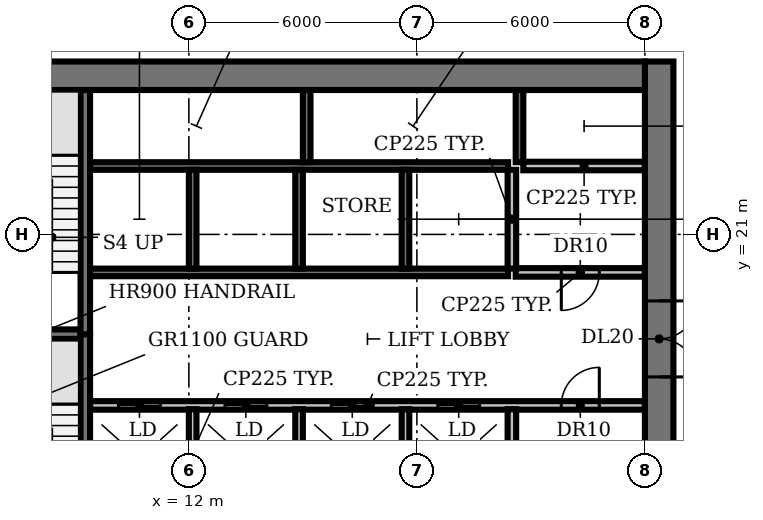
"""IFC4 building model, lengths in metres.
Left out: names, types, materials, properties, quantities, classifications, styles, units other than length and angle.
Written with IfcOpenShell. Run it as: python <this file> out.ifc"""

import sys

from ifc_helpers import new_model, si_unit, direction, frame, frame_2d, origin, place, context, subcontext, project, spatial, rectangle, extrude, element, fill, save


model = new_model("IFC4")
c1 = context("Model", 3, precision=1e-05, world=origin(), true_north=direction((0.0, 1.0)))
c2 = subcontext(c1, "Body", "Model", "MODEL_VIEW")
j1 = project(units=[si_unit("LENGTHUNIT", "METRE"), si_unit("PLANEANGLEUNIT", "RADIAN")], contexts=[c1])
p1 = place(None, origin())
s1 = spatial("IfcSite", under=j1, at=p1, CompositionType="ELEMENT")
p2 = place(p1, origin())
s2 = spatial("IfcBuilding", under=s1, at=p2, CompositionType="ELEMENT")
p3 = place(p2, frame((0.0, 0.0, 134.0)))
s3 = spatial("IfcBuildingStorey", under=s2, at=p3, CompositionType="ELEMENT", Elevation=134.0)
p4 = place(p3, frame((9.4, 16.5, 0.0), z_axis=(0.0, 0.0, 1.0), x_axis=(1.0, 0.0, 0.0)))
e1 = element("IfcWall", 1, at=p4, inside=s3, PredefinedType="PARTITIONING", context=c2, shape_type="SweptSolid", body=[
    extrude(rectangle(XDim=14.6, YDim=0.225, at=frame_2d((7.3, 0.0))), origin(), (0.0, 0.0, 1.0), 3.8),
])
p5 = place(p4, frame((0.75, 0.0, 0.0)))
e2 = element("IfcOpeningElement", 2, at=p5, cuts=e1, PredefinedType="OPENING", context=c2, shape_type="SweptSolid", body=[
    extrude(rectangle(XDim=1.1, YDim=2.1, at=frame_2d((0.55, 1.05))), frame((0.0, 0.123, 0.0), z_axis=(0.0, -1.0, 0.0), x_axis=(1.0, 0.0, 0.0)), (0.0, 0.0, 1.0), 0.245),
])
p6 = place(p4, frame((3.55, 0.0, 0.0)))
e3 = element("IfcOpeningElement", 3, at=p6, cuts=e1, PredefinedType="OPENING", context=c2, shape_type="SweptSolid", body=[
    extrude(rectangle(XDim=1.1, YDim=2.1, at=frame_2d((0.55, 1.05))), frame((0.0, 0.123, 0.0), z_axis=(0.0, -1.0, 0.0), x_axis=(1.0, 0.0, 0.0)), (0.0, 0.0, 1.0), 0.245),
])
p7 = place(p4, frame((6.35, 0.0, 0.0)))
e4 = element("IfcOpeningElement", 4, at=p7, cuts=e1, PredefinedType="OPENING", context=c2, shape_type="SweptSolid", body=[
    extrude(rectangle(XDim=1.1, YDim=2.1, at=frame_2d((0.55, 1.05))), frame((0.0, 0.123, 0.0), z_axis=(0.0, -1.0, 0.0), x_axis=(1.0, 0.0, 0.0)), (0.0, 0.0, 1.0), 0.245),
])
p8 = place(p4, frame((9.15, 0.0, 0.0)))
e5 = element("IfcOpeningElement", 5, at=p8, cuts=e1, PredefinedType="OPENING", context=c2, shape_type="SweptSolid", body=[
    extrude(rectangle(XDim=1.1, YDim=2.1, at=frame_2d((0.55, 1.05))), frame((0.0, 0.123, 0.0), z_axis=(0.0, -1.0, 0.0), x_axis=(1.0, 0.0, 0.0)), (0.0, 0.0, 1.0), 0.245),
])
p9 = place(p4, frame((12.4, 0.0, 0.0)))
e6 = element("IfcOpeningElement", 6, at=p9, cuts=e1, PredefinedType="OPENING", context=c2, shape_type="SweptSolid", body=[
    extrude(rectangle(XDim=1.0, YDim=2.1, at=frame_2d((0.5, 1.05))), frame((0.0, 0.123, 0.0), z_axis=(0.0, -1.0, 0.0), x_axis=(1.0, 0.0, 0.0)), (0.0, 0.0, 1.0), 0.245),
])
p10 = place(p3, frame((6.0, 18.375, 0.0), z_axis=(0.0, 0.0, 1.0), x_axis=(1.0, 0.0, 0.0)))
e7 = element("IfcWall", 7, at=p10, inside=s3, PredefinedType="SHEAR", context=c2, shape_type="SweptSolid", body=[
    extrude(rectangle(XDim=3.15, YDim=0.25, at=frame_2d((1.575, 0.0))), origin(), (0.0, 0.0, 1.0), 3.8),
])
p11 = place(p3, frame((9.4, 20.0, 0.0), z_axis=(0.0, 0.0, 1.0), x_axis=(1.0, 0.0, 0.0)))
e8 = element("IfcWall", 8, at=p11, inside=s3, PredefinedType="SHEAR", context=c2, shape_type="SweptSolid", body=[
    extrude(rectangle(XDim=11.0, YDim=0.2, at=frame_2d((5.5, 0.0))), origin(), (0.0, 0.0, 1.0), 3.8),
])
p12 = place(p3, frame((24.0, 20.0, 0.0), z_axis=(0.0, 0.0, 1.0), x_axis=(-1.0, 0.0, 0.0)))
e9 = element("IfcWall", 9, at=p12, inside=s3, PredefinedType="PARTITIONING", context=c2, shape_type="SweptSolid", body=[
    extrude(rectangle(XDim=3.4, YDim=0.225, at=frame_2d((1.7, 0.0))), origin(), (0.0, 0.0, 1.0), 3.8),
])
p13 = place(p12, frame((1.2, 0.0, 0.0)))
e10 = element("IfcOpeningElement", 10, at=p13, cuts=e9, PredefinedType="OPENING", context=c2, shape_type="SweptSolid", body=[
    extrude(rectangle(XDim=1.0, YDim=2.1, at=frame_2d((0.5, 1.05))), frame((0.0, 0.123, 0.0), z_axis=(0.0, -1.0, 0.0), x_axis=(1.0, 0.0, 0.0)), (0.0, 0.0, 1.0), 0.245),
])
p14 = place(p3, frame((9.4, 22.8, 0.0), z_axis=(0.0, 0.0, 1.0), x_axis=(1.0, 0.0, 0.0)))
e11 = element("IfcWall", 11, at=p14, inside=s3, PredefinedType="SHEAR", context=c2, shape_type="SweptSolid", body=[
    extrude(rectangle(XDim=11.0, YDim=0.2, at=frame_2d((5.5, 0.0))), origin(), (0.0, 0.0, 1.0), 3.8),
])
p15 = place(p3, frame((20.8, 22.8, 0.0), z_axis=(0.0, 0.0, 1.0), x_axis=(1.0, 0.0, 0.0)))
e12 = element("IfcWall", 12, at=p15, inside=s3, PredefinedType="PARTITIONING", context=c2, shape_type="SweptSolid", body=[
    extrude(rectangle(XDim=3.2, YDim=0.225, at=frame_2d((1.6, 0.0))), origin(), (0.0, 0.0, 1.0), 3.8),
])
p16 = place(p3, frame((9.275, 18.375, 0.0), z_axis=(0.0, 0.0, 1.0), x_axis=(0.0, -1.0, 0.0)))
e13 = element("IfcWall", 13, at=p16, inside=s3, PredefinedType="SHEAR", context=c2, shape_type="SweptSolid", body=[
    extrude(rectangle(XDim=6.55, YDim=0.25, at=frame_2d((3.275, 0.0))), origin(), (0.0, 0.0, 1.0), 3.8),
])
p17 = place(p16, frame((5.075, 0.0, 0.0)))
e14 = element("IfcOpeningElement", 14, at=p17, cuts=e13, PredefinedType="OPENING", context=c2, shape_type="SweptSolid", body=[
    extrude(rectangle(XDim=1.0, YDim=2.1, at=frame_2d((0.5, 1.05))), frame((0.0, 0.135, 0.0), z_axis=(0.0, -1.0, 0.0), x_axis=(1.0, 0.0, 0.0)), (0.0, 0.0, 1.0), 0.27),
])
p18 = place(p3, frame((9.275, 18.375, 0.0), z_axis=(0.0, 0.0, 1.0), x_axis=(0.0, 1.0, 0.0)))
e15 = element("IfcWall", 15, at=p18, inside=s3, PredefinedType="SHEAR", context=c2, shape_type="SweptSolid", body=[
    extrude(rectangle(XDim=6.425, YDim=0.25, at=frame_2d((3.212, 0.0))), origin(), (0.0, 0.0, 1.0), 3.8),
])
p19 = place(p3, frame((12.1, 13.8, 0.0), z_axis=(0.0, 0.0, 1.0), x_axis=(0.0, 1.0, 0.0)))
e16 = element("IfcWall", 16, at=p19, inside=s3, PredefinedType="SOLIDWALL", context=c2, shape_type="SweptSolid", body=[
    extrude(rectangle(XDim=2.6, YDim=0.2, at=frame_2d((1.3, 0.0))), origin(), (0.0, 0.0, 1.0), 3.8),
])
p20 = place(p3, frame((12.1, 20.1, 0.0), z_axis=(0.0, 0.0, 1.0), x_axis=(0.0, 1.0, 0.0)))
e17 = element("IfcWall", 17, at=p20, inside=s3, PredefinedType="SHEAR", context=c2, shape_type="SweptSolid", body=[
    extrude(rectangle(XDim=2.6, YDim=0.2, at=frame_2d((1.3, 0.0))), origin(), (0.0, 0.0, 1.0), 3.8),
])
p21 = place(p3, frame((14.9, 13.8, 0.0), z_axis=(0.0, 0.0, 1.0), x_axis=(0.0, 1.0, 0.0)))
e18 = element("IfcWall", 18, at=p21, inside=s3, PredefinedType="SOLIDWALL", context=c2, shape_type="SweptSolid", body=[
    extrude(rectangle(XDim=2.6, YDim=0.2, at=frame_2d((1.3, 0.0))), origin(), (0.0, 0.0, 1.0), 3.8),
])
p22 = place(p3, frame((14.9, 20.1, 0.0), z_axis=(0.0, 0.0, 1.0), x_axis=(0.0, 1.0, 0.0)))
e19 = element("IfcWall", 19, at=p22, inside=s3, PredefinedType="SHEAR", context=c2, shape_type="SweptSolid", body=[
    extrude(rectangle(XDim=2.6, YDim=0.2, at=frame_2d((1.3, 0.0))), origin(), (0.0, 0.0, 1.0), 3.8),
])
p23 = place(p3, frame((15.1, 22.9, 0.0), z_axis=(0.0, 0.0, 1.0), x_axis=(0.0, 1.0, 0.0)))
e20 = element("IfcWall", 20, at=p23, inside=s3, PredefinedType="SHEAR", context=c2, shape_type="SweptSolid", body=[
    extrude(rectangle(XDim=1.9, YDim=0.2, at=frame_2d((0.95, 0.0))), origin(), (0.0, 0.0, 1.0), 3.8),
])
p24 = place(p3, frame((17.7, 13.8, 0.0), z_axis=(0.0, 0.0, 1.0), x_axis=(0.0, 1.0, 0.0)))
e21 = element("IfcWall", 21, at=p24, inside=s3, PredefinedType="SOLIDWALL", context=c2, shape_type="SweptSolid", body=[
    extrude(rectangle(XDim=2.6, YDim=0.2, at=frame_2d((1.3, 0.0))), origin(), (0.0, 0.0, 1.0), 3.8),
])
p25 = place(p3, frame((17.7, 20.1, 0.0), z_axis=(0.0, 0.0, 1.0), x_axis=(0.0, 1.0, 0.0)))
e22 = element("IfcWall", 22, at=p25, inside=s3, PredefinedType="SHEAR", context=c2, shape_type="SweptSolid", body=[
    extrude(rectangle(XDim=2.6, YDim=0.2, at=frame_2d((1.3, 0.0))), origin(), (0.0, 0.0, 1.0), 3.8),
])
for number, where, z_axis, x_axis in (
    (23, (20.5, 13.8, 0.0), (0.0, 0.0, 1.0), (0.0, 1.0, 0.0)),
    (24, (20.5, 20.1, 0.0), (0.0, 0.0, 1.0), (0.0, 1.0, 0.0)),
):
    element("IfcWall", number, at=place(p3, frame(where, z_axis=z_axis, x_axis=x_axis)), inside=s3, PredefinedType="PARTITIONING", context=c2, shape_type="SweptSolid", body=[
        extrude(rectangle(XDim=2.6, YDim=0.225, at=frame_2d((1.3, 0.0))), origin(), (0.0, 0.0, 1.0), 3.8),
    ])
p26 = place(p3, frame((20.7, 22.9, 0.0), z_axis=(0.0, 0.0, 1.0), x_axis=(0.0, 1.0, 0.0)))
e25 = element("IfcWall", 25, at=p26, inside=s3, PredefinedType="SHEAR", context=c2, shape_type="SweptSolid", body=[
    extrude(rectangle(XDim=1.9, YDim=0.2, at=frame_2d((0.95, 0.0))), origin(), (0.0, 0.0, 1.0), 3.8),
])
p27 = place(p3, frame((24.375, 25.55, 0.0), z_axis=(0.0, 0.0, 1.0), x_axis=(0.0, -1.0, 0.0)))
e26 = element("IfcWall", 26, at=p27, inside=s3, PredefinedType="SHEAR", context=c2, shape_type="SweptSolid", body=[
    extrude(rectangle(XDim=21.08, YDim=0.75, at=frame_2d((10.54, 0.0))), origin(), (0.0, 0.0, 1.0), 3.8),
])
p28 = place(p27, frame((18.4, 0.0, 0.0)))
e27 = element("IfcOpeningElement", 27, at=p28, cuts=e26, PredefinedType="OPENING", context=c2, shape_type="SweptSolid", body=[
    extrude(rectangle(XDim=1.5, YDim=2.1, at=frame_2d((0.75, 1.05))), frame((0.0, 0.385, 0.0), z_axis=(0.0, -1.0, 0.0), x_axis=(1.0, 0.0, 0.0)), (0.0, 0.0, 1.0), 0.77),
])
p29 = place(p27, frame((12.3, 0.0, 0.0)))
e28 = element("IfcOpeningElement", 28, at=p29, cuts=e26, PredefinedType="OPENING", context=c2, shape_type="SweptSolid", body=[
    extrude(rectangle(XDim=0.9, YDim=2.1, at=frame_2d((0.45, 1.05))), frame((0.0, 0.385, 0.0), z_axis=(0.0, -1.0, 0.0), x_axis=(1.0, 0.0, 0.0)), (0.0, 0.0, 1.0), 0.77),
])
p30 = place(p27, frame((6.3, 0.0, 0.0)))
e29 = element("IfcOpeningElement", 29, at=p30, cuts=e26, PredefinedType="OPENING", context=c2, shape_type="SweptSolid", body=[
    extrude(rectangle(XDim=2.0, YDim=2.1, at=frame_2d((1.0, 1.05))), frame((0.0, 0.385, 0.0), z_axis=(0.0, -1.0, 0.0), x_axis=(1.0, 0.0, 0.0)), (0.0, 0.0, 1.0), 0.77),
])
p31 = place(p3, frame((6.0, 25.175, 0.0), z_axis=(0.0, 0.0, 1.0), x_axis=(1.0, 0.0, 0.0)))
e30 = element("IfcWall", 30, at=p31, inside=s3, PredefinedType="SHEAR", context=c2, shape_type="SweptSolid", body=[
    extrude(rectangle(XDim=18.0, YDim=0.75, at=frame_2d((9.0, 0.0))), origin(), (0.0, 0.0, 1.0), 3.8),
])
p32 = place(p5, origin())
e31 = element("IfcDoor", 31, at=p32, inside=s3, OperationType="DOUBLE_DOOR_SLIDING", PredefinedType="DOOR", context=c2, shape_type="SweptSolid", body=[
    extrude(rectangle(XDim=1.1, YDim=2.1, at=frame_2d((0.55, 1.05))), frame((0.0, 0.025, 0.0), z_axis=(0.0, -1.0, 0.0), x_axis=(1.0, 0.0, 0.0)), (0.0, 0.0, 1.0), 0.05),
])
fill(e2, e31)
p33 = place(p6, origin())
e32 = element("IfcDoor", 32, at=p33, inside=s3, OperationType="DOUBLE_DOOR_SLIDING", PredefinedType="DOOR", context=c2, shape_type="SweptSolid", body=[
    extrude(rectangle(XDim=1.1, YDim=2.1, at=frame_2d((0.55, 1.05))), frame((0.0, 0.025, 0.0), z_axis=(0.0, -1.0, 0.0), x_axis=(1.0, 0.0, 0.0)), (0.0, 0.0, 1.0), 0.05),
])
fill(e3, e32)
p34 = place(p7, origin())
e33 = element("IfcDoor", 33, at=p34, inside=s3, OperationType="DOUBLE_DOOR_SLIDING", PredefinedType="DOOR", context=c2, shape_type="SweptSolid", body=[
    extrude(rectangle(XDim=1.1, YDim=2.1, at=frame_2d((0.55, 1.05))), frame((0.0, 0.025, 0.0), z_axis=(0.0, -1.0, 0.0), x_axis=(1.0, 0.0, 0.0)), (0.0, 0.0, 1.0), 0.05),
])
fill(e4, e33)
p35 = place(p8, origin())
e34 = element("IfcDoor", 34, at=p35, inside=s3, OperationType="DOUBLE_DOOR_SLIDING", PredefinedType="DOOR", context=c2, shape_type="SweptSolid", body=[
    extrude(rectangle(XDim=1.1, YDim=2.1, at=frame_2d((0.55, 1.05))), frame((0.0, 0.025, 0.0), z_axis=(0.0, -1.0, 0.0), x_axis=(1.0, 0.0, 0.0)), (0.0, 0.0, 1.0), 0.05),
])
fill(e5, e34)
p36 = place(p9, origin())
e35 = element("IfcDoor", 35, at=p36, inside=s3, OperationType="SINGLE_SWING_RIGHT", PredefinedType="DOOR", context=c2, shape_type="SweptSolid", body=[
    extrude(rectangle(XDim=1.0, YDim=2.1, at=frame_2d((0.5, 1.05))), frame((0.0, 0.025, 0.0), z_axis=(0.0, -1.0, 0.0), x_axis=(1.0, 0.0, 0.0)), (0.0, 0.0, 1.0), 0.05),
])
fill(e6, e35)
p37 = place(p13, origin())
e36 = element("IfcDoor", 36, at=p37, inside=s3, OperationType="SINGLE_SWING_RIGHT", PredefinedType="DOOR", context=c2, shape_type="SweptSolid", body=[
    extrude(rectangle(XDim=1.0, YDim=2.1, at=frame_2d((0.5, 1.05))), frame((0.0, 0.025, 0.0), z_axis=(0.0, -1.0, 0.0), x_axis=(1.0, 0.0, 0.0)), (0.0, 0.0, 1.0), 0.05),
])
fill(e10, e36)
p38 = place(p30, origin())
e37 = element("IfcDoor", 37, at=p38, inside=s3, OperationType="DOUBLE_DOOR_SINGLE_SWING", PredefinedType="DOOR", context=c2, shape_type="SweptSolid", body=[
    extrude(rectangle(XDim=2.0, YDim=2.1, at=frame_2d((1.0, 1.05))), frame((0.0, 0.025, 0.0), z_axis=(0.0, -1.0, 0.0), x_axis=(1.0, 0.0, 0.0)), (0.0, 0.0, 1.0), 0.05),
])
fill(e29, e37)
save(model, sys.argv[1])
